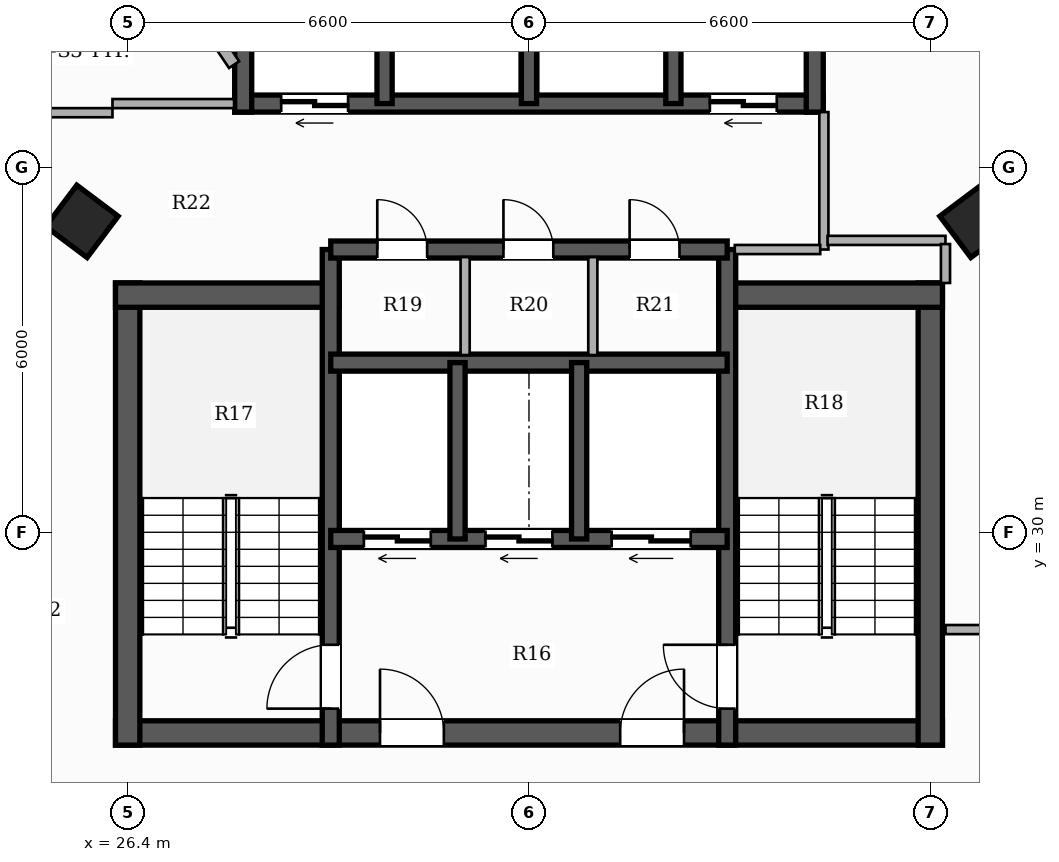
"""IFC4 building model, lengths in metres.
Left out: names, types, materials, properties, quantities, classifications, styles, units other than length and angle.
Written with IfcOpenShell. Run it as: python <this file> out.ifc"""

import sys

from ifc_helpers import new_model, si_unit, direction, frame, frame_2d, origin, origin_2d, place, context, subcontext, project, spatial, rectangle, hollow_rectangle, extrude, element, fill, save


model = new_model("IFC4")
c1 = context("Model", 3, precision=1e-05, world=origin(), true_north=direction((0.0, 1.0)))
c2 = subcontext(c1, "Body", "Model", "MODEL_VIEW")
j1 = project(units=[si_unit("LENGTHUNIT", "METRE"), si_unit("PLANEANGLEUNIT", "RADIAN")], contexts=[c1])
p1 = place(None, origin())
s1 = spatial("IfcSite", under=j1, at=p1, CompositionType="ELEMENT")
p2 = place(p1, origin())
s2 = spatial("IfcBuilding", under=s1, at=p2, CompositionType="ELEMENT")
p3 = place(p2, frame((0.0, 0.0, 180.35)))
s3 = spatial("IfcBuildingStorey", under=s2, at=p3, CompositionType="ELEMENT", Elevation=180.35)
p4 = place(p3, frame((26.2, 26.7, 0.0), z_axis=(0.0, 0.0, 1.0), x_axis=(1.0, 0.0, 0.0)))
e1 = element("IfcWall", 1, at=p4, inside=s3, PredefinedType="SHEAR", context=c2, shape_type="SweptSolid", body=[
    extrude(rectangle(XDim=13.6, YDim=0.4, at=frame_2d((6.8, 0.0))), origin(), (0.0, 0.0, 1.0), 3.3),
])
p5 = place(p4, frame((4.35, 0.0, 0.0)))
e2 = element("IfcOpeningElement", 2, at=p5, cuts=e1, PredefinedType="OPENING", context=c2, shape_type="SweptSolid", body=[
    extrude(rectangle(XDim=1.05, YDim=2.15, at=frame_2d((0.525, 1.075))), frame((0.0, 0.21, 0.0), z_axis=(0.0, -1.0, 0.0), x_axis=(1.0, 0.0, 0.0)), (0.0, 0.0, 1.0), 0.42),
])
p6 = place(p4, frame((8.3, 0.0, 0.0)))
e3 = element("IfcOpeningElement", 3, at=p6, cuts=e1, PredefinedType="OPENING", context=c2, shape_type="SweptSolid", body=[
    extrude(rectangle(XDim=1.05, YDim=2.15, at=frame_2d((0.525, 1.075))), frame((0.0, 0.21, 0.0), z_axis=(0.0, -1.0, 0.0), x_axis=(1.0, 0.0, 0.0)), (0.0, 0.0, 1.0), 0.42),
])
p7 = place(p3, frame((26.4, 26.5, 0.0), z_axis=(0.0, 0.0, 1.0), x_axis=(0.0, 1.0, 0.0)))
e4 = element("IfcWall", 4, at=p7, inside=s3, PredefinedType="SHEAR", context=c2, shape_type="SweptSolid", body=[
    extrude(rectangle(XDim=7.6, YDim=0.4, at=frame_2d((3.8, 0.0))), origin(), (0.0, 0.0, 1.0), 3.3),
])
p8 = place(p3, frame((26.2, 33.9, 0.0), z_axis=(0.0, 0.0, 1.0), x_axis=(1.0, 0.0, 0.0)))
e5 = element("IfcWall", 5, at=p8, inside=s3, PredefinedType="SHEAR", context=c2, shape_type="SweptSolid", body=[
    extrude(rectangle(XDim=3.68, YDim=0.4, at=frame_2d((1.84, 0.0))), origin(), (0.0, 0.0, 1.0), 3.3),
])
p9 = place(p3, frame((39.6, 26.5, 0.0), z_axis=(0.0, 0.0, 1.0), x_axis=(0.0, 1.0, 0.0)))
e6 = element("IfcWall", 6, at=p9, inside=s3, PredefinedType="SHEAR", context=c2, shape_type="SweptSolid", body=[
    extrude(rectangle(XDim=7.6, YDim=0.4, at=frame_2d((3.8, 0.0))), origin(), (0.0, 0.0, 1.0), 3.3),
])
p10 = place(p3, frame((36.12, 33.9, 0.0), z_axis=(0.0, 0.0, 1.0), x_axis=(1.0, 0.0, 0.0)))
e7 = element("IfcWall", 7, at=p10, inside=s3, PredefinedType="SHEAR", context=c2, shape_type="SweptSolid", body=[
    extrude(rectangle(XDim=3.68, YDim=0.4, at=frame_2d((1.84, 0.0))), origin(), (0.0, 0.0, 1.0), 3.3),
])
p11 = place(p3, frame((29.74, 26.5, 0.0), z_axis=(0.0, 0.0, 1.0), x_axis=(0.0, 1.0, 0.0)))
e8 = element("IfcWall", 8, at=p11, inside=s3, PredefinedType="SHEAR", context=c2, shape_type="SweptSolid", body=[
    extrude(rectangle(XDim=8.15, YDim=0.28, at=frame_2d((4.075, 0.0))), origin(), (0.0, 0.0, 1.0), 3.3),
])
p12 = place(p11, frame((0.6, 0.0, 0.0)))
e9 = element("IfcOpeningElement", 9, at=p12, cuts=e8, PredefinedType="OPENING", context=c2, shape_type="SweptSolid", body=[
    extrude(rectangle(XDim=1.05, YDim=2.15, at=frame_2d((0.525, 1.075))), frame((0.0, 0.15, 0.0), z_axis=(0.0, -1.0, 0.0), x_axis=(1.0, 0.0, 0.0)), (0.0, 0.0, 1.0), 0.3),
])
p13 = place(p3, frame((36.26, 26.5, 0.0), z_axis=(0.0, 0.0, 1.0), x_axis=(0.0, 1.0, 0.0)))
e10 = element("IfcWall", 10, at=p13, inside=s3, PredefinedType="SHEAR", context=c2, shape_type="SweptSolid", body=[
    extrude(rectangle(XDim=8.15, YDim=0.28, at=frame_2d((4.075, 0.0))), origin(), (0.0, 0.0, 1.0), 3.3),
])
p14 = place(p13, frame((0.6, 0.0, 0.0)))
e11 = element("IfcOpeningElement", 11, at=p14, cuts=e10, PredefinedType="OPENING", context=c2, shape_type="SweptSolid", body=[
    extrude(rectangle(XDim=1.05, YDim=2.15, at=frame_2d((0.525, 1.075))), frame((0.0, 0.15, 0.0), z_axis=(0.0, -1.0, 0.0), x_axis=(1.0, 0.0, 0.0)), (0.0, 0.0, 1.0), 0.3),
])
p15 = place(p3, frame((36.26, 29.89, 0.0), z_axis=(0.0, 0.0, 1.0), x_axis=(-1.0, 0.0, 0.0)))
e12 = element("IfcWall", 12, at=p15, inside=s3, PredefinedType="SHEAR", context=c2, shape_type="SweptSolid", body=[
    extrude(rectangle(XDim=6.52, YDim=0.28, at=frame_2d((3.26, 0.0))), origin(), (0.0, 0.0, 1.0), 3.3),
])
p16 = place(p15, frame((4.875, 0.0, 0.0)))
e13 = element("IfcOpeningElement", 13, at=p16, cuts=e12, PredefinedType="OPENING", context=c2, shape_type="SweptSolid", body=[
    extrude(rectangle(XDim=1.1, YDim=2.2, at=frame_2d((0.55, 1.1))), frame((0.0, 0.15, 0.0), z_axis=(0.0, -1.0, 0.0), x_axis=(1.0, 0.0, 0.0)), (0.0, 0.0, 1.0), 0.3),
])
p17 = place(p15, frame((2.875, 0.0, 0.0)))
e14 = element("IfcOpeningElement", 14, at=p17, cuts=e12, PredefinedType="OPENING", context=c2, shape_type="SweptSolid", body=[
    extrude(rectangle(XDim=1.1, YDim=2.2, at=frame_2d((0.55, 1.1))), frame((0.0, 0.15, 0.0), z_axis=(0.0, -1.0, 0.0), x_axis=(1.0, 0.0, 0.0)), (0.0, 0.0, 1.0), 0.3),
])
p18 = place(p15, frame((0.6, 0.0, 0.0)))
e15 = element("IfcOpeningElement", 15, at=p18, cuts=e12, PredefinedType="OPENING", context=c2, shape_type="SweptSolid", body=[
    extrude(rectangle(XDim=1.3, YDim=2.2, at=frame_2d((0.65, 1.1))), frame((0.0, 0.15, 0.0), z_axis=(0.0, -1.0, 0.0), x_axis=(1.0, 0.0, 0.0)), (0.0, 0.0, 1.0), 0.3),
])
p19 = place(p3, frame((29.74, 32.79, 0.0), z_axis=(0.0, 0.0, 1.0), x_axis=(1.0, 0.0, 0.0)))
e16 = element("IfcWall", 16, at=p19, inside=s3, PredefinedType="SHEAR", context=c2, shape_type="SweptSolid", body=[
    extrude(rectangle(XDim=6.52, YDim=0.28, at=frame_2d((3.26, 0.0))), origin(), (0.0, 0.0, 1.0), 3.3),
])
for number, where, z_axis, x_axis in (
    (17, (31.825, 29.89, 0.0), (0.0, 0.0, 1.0), (0.0, 1.0, 0.0)),
    (18, (33.825, 29.89, 0.0), (0.0, 0.0, 1.0), (0.0, 1.0, 0.0)),
):
    element("IfcWall", number, at=place(p3, frame(where, z_axis=z_axis, x_axis=x_axis)), inside=s3, PredefinedType="SHEAR", context=c2, shape_type="SweptSolid", body=[
        extrude(rectangle(XDim=2.9, YDim=0.25, at=frame_2d((1.45, 0.0))), origin(), (0.0, 0.0, 1.0), 3.3),
    ])
p20 = place(p3, frame((29.74, 34.65, 0.0), z_axis=(0.0, 0.0, 1.0), x_axis=(1.0, 0.0, 0.0)))
e19 = element("IfcWall", 19, at=p20, inside=s3, PredefinedType="SHEAR", context=c2, shape_type="SweptSolid", body=[
    extrude(rectangle(XDim=6.52, YDim=0.28, at=frame_2d((3.26, 0.0))), origin(), (0.0, 0.0, 1.0), 3.3),
])
p21 = place(p20, frame((0.765, 0.0, 0.0)))
e20 = element("IfcOpeningElement", 20, at=p21, cuts=e19, PredefinedType="OPENING", context=c2, shape_type="SweptSolid", body=[
    extrude(rectangle(XDim=0.82, YDim=2.1, at=frame_2d((0.41, 1.05))), frame((0.0, 0.15, 0.0), z_axis=(0.0, -1.0, 0.0), x_axis=(1.0, 0.0, 0.0)), (0.0, 0.0, 1.0), 0.3),
])
p22 = place(p20, frame((2.84, 0.0, 0.0)))
e21 = element("IfcOpeningElement", 21, at=p22, cuts=e19, PredefinedType="OPENING", context=c2, shape_type="SweptSolid", body=[
    extrude(rectangle(XDim=0.82, YDim=2.1, at=frame_2d((0.41, 1.05))), frame((0.0, 0.15, 0.0), z_axis=(0.0, -1.0, 0.0), x_axis=(1.0, 0.0, 0.0)), (0.0, 0.0, 1.0), 0.3),
])
p23 = place(p20, frame((4.915, 0.0, 0.0)))
e22 = element("IfcOpeningElement", 22, at=p23, cuts=e19, PredefinedType="OPENING", context=c2, shape_type="SweptSolid", body=[
    extrude(rectangle(XDim=0.82, YDim=2.1, at=frame_2d((0.41, 1.05))), frame((0.0, 0.15, 0.0), z_axis=(0.0, -1.0, 0.0), x_axis=(1.0, 0.0, 0.0)), (0.0, 0.0, 1.0), 0.3),
])
p24 = place(p3, frame((37.84, 37.05, 0.0), z_axis=(0.0, 0.0, 1.0), x_axis=(-1.0, 0.0, 0.0)))
e23 = element("IfcWall", 23, at=p24, inside=s3, PredefinedType="SHEAR", context=c2, shape_type="SweptSolid", body=[
    extrude(rectangle(XDim=9.68, YDim=0.28, at=frame_2d((4.84, 0.0))), origin(), (0.0, 0.0, 1.0), 3.3),
])
p25 = place(p24, frame((7.815, 0.0, 0.0)))
e24 = element("IfcOpeningElement", 24, at=p25, cuts=e23, PredefinedType="OPENING", context=c2, shape_type="SweptSolid", body=[
    extrude(rectangle(XDim=1.1, YDim=2.2, at=frame_2d((0.55, 1.1))), frame((0.0, 0.15, 0.0), z_axis=(0.0, -1.0, 0.0), x_axis=(1.0, 0.0, 0.0)), (0.0, 0.0, 1.0), 0.3),
])
p26 = place(p24, frame((0.765, 0.0, 0.0)))
e25 = element("IfcOpeningElement", 25, at=p26, cuts=e23, PredefinedType="OPENING", context=c2, shape_type="SweptSolid", body=[
    extrude(rectangle(XDim=1.1, YDim=2.2, at=frame_2d((0.55, 1.1))), frame((0.0, 0.15, 0.0), z_axis=(0.0, -1.0, 0.0), x_axis=(1.0, 0.0, 0.0)), (0.0, 0.0, 1.0), 0.3),
])
for number, where, z_axis, x_axis in (
    (26, (28.3, 36.91, 0.0), (0.0, 0.0, 1.0), (0.0, 1.0, 0.0)),
    (27, (37.7, 36.91, 0.0), (0.0, 0.0, 1.0), (0.0, 1.0, 0.0)),
):
    element("IfcWall", number, at=place(p3, frame(where, z_axis=z_axis, x_axis=x_axis)), inside=s3, PredefinedType="SHEAR", context=c2, shape_type="SweptSolid", body=[
        extrude(rectangle(XDim=2.83, YDim=0.28, at=frame_2d((1.415, 0.0))), origin(), (0.0, 0.0, 1.0), 3.3),
    ])
for number, where, z_axis, x_axis in (
    (28, (30.625, 37.05, 0.0), (0.0, 0.0, 1.0), (0.0, 1.0, 0.0)),
    (29, (33.0, 37.05, 0.0), (0.0, 0.0, 1.0), (0.0, 1.0, 0.0)),
    (30, (35.375, 37.05, 0.0), (0.0, 0.0, 1.0), (0.0, 1.0, 0.0)),
):
    element("IfcWall", number, at=place(p3, frame(where, z_axis=z_axis, x_axis=x_axis)), inside=s3, PredefinedType="SHEAR", context=c2, shape_type="SweptSolid", body=[
        extrude(rectangle(XDim=2.55, YDim=0.25, at=frame_2d((1.275, 0.0))), origin(), (0.0, 0.0, 1.0), 3.3),
    ])
for number, where, z_axis, x_axis in (
    (31, (25.648, 35.113, 0.0), (0.0, 0.0, 1.0), (0.6, 0.8, 0.0)),
    (32, (40.352, 35.113, 0.0), (0.0, 0.0, 1.0), (-0.6, 0.8, 0.0)),
):
    element("IfcColumn", number, at=place(p3, frame(where, z_axis=z_axis, x_axis=x_axis)), inside=s3, PredefinedType="COLUMN", context=c2, shape_type="SweptSolid", body=[
        extrude(hollow_rectangle(XDim=0.85, YDim=0.85, WallThickness=0.028, at=origin_2d()), origin(), (0.0, 0.0, 1.0), 3.3),
    ])
p27 = place(p3, frame((37.85, 34.65, 0.0), z_axis=(0.0, 0.0, 1.0), x_axis=(0.0, 1.0, 0.0)))
e33 = element("IfcWall", 33, at=p27, inside=s3, PredefinedType="PARTITIONING", context=c2, shape_type="SweptSolid", body=[
    extrude(rectangle(XDim=2.26, YDim=0.15, at=frame_2d((1.13, 0.0))), origin(), (0.0, 0.0, 1.0), 3.06),
])
p28 = place(p3, frame((36.385, 34.65, 0.0), z_axis=(0.0, 0.0, 1.0), x_axis=(1.0, 0.0, 0.0)))
e34 = element("IfcWall", 34, at=p28, inside=s3, PredefinedType="PARTITIONING", context=c2, shape_type="SweptSolid", body=[
    extrude(rectangle(XDim=1.405, YDim=0.15, at=frame_2d((0.703, 0.0))), origin(), (0.0, 0.0, 1.0), 2.425),
])
for number, where, z_axis, x_axis in (
    (35, (31.95, 32.915, 0.0), (0.0, 0.0, 1.0), (0.0, 1.0, 0.0)),
    (36, (34.05, 32.915, 0.0), (0.0, 0.0, 1.0), (0.0, 1.0, 0.0)),
):
    element("IfcWall", number, at=place(p3, frame(where, z_axis=z_axis, x_axis=x_axis)), inside=s3, PredefinedType="PARTITIONING", context=c2, shape_type="SweptSolid", body=[
        extrude(rectangle(XDim=1.61, YDim=0.15, at=frame_2d((0.805, 0.0))), origin(), (0.0, 0.0, 1.0), 3.06),
    ])
p29 = place(p3, frame((23.56, 36.9, 0.0), z_axis=(0.0, 0.0, 1.0), x_axis=(1.0, 0.0, 0.0)))
e37 = element("IfcWall", 37, at=p29, inside=s3, PredefinedType="PARTITIONING", context=c2, shape_type="SweptSolid", body=[
    extrude(rectangle(XDim=2.59, YDim=0.15, at=frame_2d((1.295, 0.0))), origin(), (0.0, 0.0, 1.0), 2.413),
])
p30 = place(p3, frame((39.85, 28.4, 0.0), z_axis=(0.0, 0.0, 1.0), x_axis=(1.0, 0.0, 0.0)))
e38 = element("IfcWall", 38, at=p30, inside=s3, PredefinedType="PARTITIONING", context=c2, shape_type="SweptSolid", body=[
    extrude(rectangle(XDim=2.5, YDim=0.15, at=frame_2d((1.25, 0.0))), origin(), (0.0, 0.0, 1.0), 2.721),
])
p31 = place(p3, frame((26.15, 37.05, 0.0), z_axis=(0.0, 0.0, 1.0), x_axis=(1.0, 0.0, 0.0)))
e39 = element("IfcWall", 39, at=p31, inside=s3, PredefinedType="PARTITIONING", context=c2, shape_type="SweptSolid", body=[
    extrude(rectangle(XDim=2.0, YDim=0.15, at=frame_2d((1.0, 0.0))), origin(), (0.0, 0.0, 1.0), 2.413),
])
p32 = place(p3, frame((37.91, 34.8, 0.0), z_axis=(0.0, 0.0, 1.0), x_axis=(1.0, 0.0, 0.0)))
e40 = element("IfcWall", 40, at=p32, inside=s3, PredefinedType="PARTITIONING", context=c2, shape_type="SweptSolid", body=[
    extrude(rectangle(XDim=1.94, YDim=0.15, at=frame_2d((0.97, 0.0))), origin(), (0.0, 0.0, 1.0), 2.721),
])
p33 = place(p3, frame((39.85, 34.74, 0.0), z_axis=(0.0, 0.0, 1.0), x_axis=(0.0, -1.0, 0.0)))
e41 = element("IfcWall", 41, at=p33, inside=s3, PredefinedType="PARTITIONING", context=c2, shape_type="SweptSolid", body=[
    extrude(rectangle(XDim=0.64, YDim=0.15, at=frame_2d((0.32, 0.0))), origin(), (0.0, 0.0, 1.0), 2.721),
])
p34 = place(p3, frame((28.15, 37.69, 0.0), z_axis=(0.0, 0.0, 1.0), x_axis=(-0.559089637851, 0.829107216738, 0.0)))
e42 = element("IfcWall", 42, at=p34, inside=s3, PredefinedType="PARTITIONING", context=c2, shape_type="SweptSolid", body=[
    extrude(rectangle(XDim=3.6, YDim=0.2, at=frame_2d((1.8, 0.0))), origin(), (0.0, 0.0, 1.0), 2.413),
])
p35 = place(p12, origin())
e43 = element("IfcDoor", 43, at=p35, inside=s3, OperationType="SINGLE_SWING_LEFT", PredefinedType="DOOR", context=c2, shape_type="SweptSolid", body=[
    extrude(rectangle(XDim=1.05, YDim=2.15, at=frame_2d((0.525, 1.075))), frame((0.0, 0.025, 0.0), z_axis=(0.0, -1.0, 0.0), x_axis=(1.0, 0.0, 0.0)), (0.0, 0.0, 1.0), 0.05),
])
fill(e9, e43)
p36 = place(p14, origin())
e44 = element("IfcDoor", 44, at=p36, inside=s3, OperationType="SINGLE_SWING_RIGHT", PredefinedType="DOOR", context=c2, shape_type="SweptSolid", body=[
    extrude(rectangle(XDim=1.05, YDim=2.15, at=frame_2d((0.525, 1.075))), frame((0.0, 0.025, 0.0), z_axis=(0.0, -1.0, 0.0), x_axis=(1.0, 0.0, 0.0)), (0.0, 0.0, 1.0), 0.05),
])
fill(e11, e44)
p37 = place(p5, origin())
e45 = element("IfcDoor", 45, at=p37, inside=s3, OperationType="SINGLE_SWING_LEFT", PredefinedType="DOOR", context=c2, shape_type="SweptSolid", body=[
    extrude(rectangle(XDim=1.05, YDim=2.15, at=frame_2d((0.525, 1.075))), frame((0.0, 0.025, 0.0), z_axis=(0.0, -1.0, 0.0), x_axis=(1.0, 0.0, 0.0)), (0.0, 0.0, 1.0), 0.05),
])
fill(e2, e45)
p38 = place(p6, origin())
e46 = element("IfcDoor", 46, at=p38, inside=s3, OperationType="SINGLE_SWING_RIGHT", PredefinedType="DOOR", context=c2, shape_type="SweptSolid", body=[
    extrude(rectangle(XDim=1.05, YDim=2.15, at=frame_2d((0.525, 1.075))), frame((0.0, 0.025, 0.0), z_axis=(0.0, -1.0, 0.0), x_axis=(1.0, 0.0, 0.0)), (0.0, 0.0, 1.0), 0.05),
])
fill(e3, e46)
p39 = place(p16, origin())
e47 = element("IfcDoor", 47, at=p39, inside=s3, OperationType="DOUBLE_DOOR_SLIDING", PredefinedType="DOOR", context=c2, shape_type="SweptSolid", body=[
    extrude(rectangle(XDim=1.1, YDim=2.2, at=frame_2d((0.55, 1.1))), frame((0.0, 0.025, 0.0), z_axis=(0.0, -1.0, 0.0), x_axis=(1.0, 0.0, 0.0)), (0.0, 0.0, 1.0), 0.05),
])
fill(e13, e47)
p40 = place(p17, origin())
e48 = element("IfcDoor", 48, at=p40, inside=s3, OperationType="DOUBLE_DOOR_SLIDING", PredefinedType="DOOR", context=c2, shape_type="SweptSolid", body=[
    extrude(rectangle(XDim=1.1, YDim=2.2, at=frame_2d((0.55, 1.1))), frame((0.0, 0.025, 0.0), z_axis=(0.0, -1.0, 0.0), x_axis=(1.0, 0.0, 0.0)), (0.0, 0.0, 1.0), 0.05),
])
fill(e14, e48)
p41 = place(p18, origin())
e49 = element("IfcDoor", 49, at=p41, inside=s3, OperationType="DOUBLE_DOOR_SLIDING", PredefinedType="DOOR", context=c2, shape_type="SweptSolid", body=[
    extrude(rectangle(XDim=1.3, YDim=2.2, at=frame_2d((0.65, 1.1))), frame((0.0, 0.025, 0.0), z_axis=(0.0, -1.0, 0.0), x_axis=(1.0, 0.0, 0.0)), (0.0, 0.0, 1.0), 0.05),
])
fill(e15, e49)
p42 = place(p25, origin())
e50 = element("IfcDoor", 50, at=p42, inside=s3, OperationType="DOUBLE_DOOR_SLIDING", PredefinedType="DOOR", context=c2, shape_type="SweptSolid", body=[
    extrude(rectangle(XDim=1.1, YDim=2.2, at=frame_2d((0.55, 1.1))), frame((0.0, 0.025, 0.0), z_axis=(0.0, -1.0, 0.0), x_axis=(1.0, 0.0, 0.0)), (0.0, 0.0, 1.0), 0.05),
])
fill(e24, e50)
p43 = place(p26, origin())
e51 = element("IfcDoor", 51, at=p43, inside=s3, OperationType="DOUBLE_DOOR_SLIDING", PredefinedType="DOOR", context=c2, shape_type="SweptSolid", body=[
    extrude(rectangle(XDim=1.1, YDim=2.2, at=frame_2d((0.55, 1.1))), frame((0.0, 0.025, 0.0), z_axis=(0.0, -1.0, 0.0), x_axis=(1.0, 0.0, 0.0)), (0.0, 0.0, 1.0), 0.05),
])
fill(e25, e51)
p44 = place(p21, origin())
e52 = element("IfcDoor", 52, at=p44, inside=s3, OperationType="SINGLE_SWING_LEFT", PredefinedType="DOOR", context=c2, shape_type="SweptSolid", body=[
    extrude(rectangle(XDim=0.82, YDim=2.1, at=frame_2d((0.41, 1.05))), frame((0.0, 0.025, 0.0), z_axis=(0.0, -1.0, 0.0), x_axis=(1.0, 0.0, 0.0)), (0.0, 0.0, 1.0), 0.05),
])
fill(e20, e52)
p45 = place(p22, origin())
e53 = element("IfcDoor", 53, at=p45, inside=s3, OperationType="SINGLE_SWING_LEFT", PredefinedType="DOOR", context=c2, shape_type="SweptSolid", body=[
    extrude(rectangle(XDim=0.82, YDim=2.1, at=frame_2d((0.41, 1.05))), frame((0.0, 0.025, 0.0), z_axis=(0.0, -1.0, 0.0), x_axis=(1.0, 0.0, 0.0)), (0.0, 0.0, 1.0), 0.05),
])
fill(e21, e53)
p46 = place(p23, origin())
e54 = element("IfcDoor", 54, at=p46, inside=s3, OperationType="SINGLE_SWING_LEFT", PredefinedType="DOOR", context=c2, shape_type="SweptSolid", body=[
    extrude(rectangle(XDim=0.82, YDim=2.1, at=frame_2d((0.41, 1.05))), frame((0.0, 0.025, 0.0), z_axis=(0.0, -1.0, 0.0), x_axis=(1.0, 0.0, 0.0)), (0.0, 0.0, 1.0), 0.05),
])
fill(e22, e54)
save(model, sys.argv[1])
